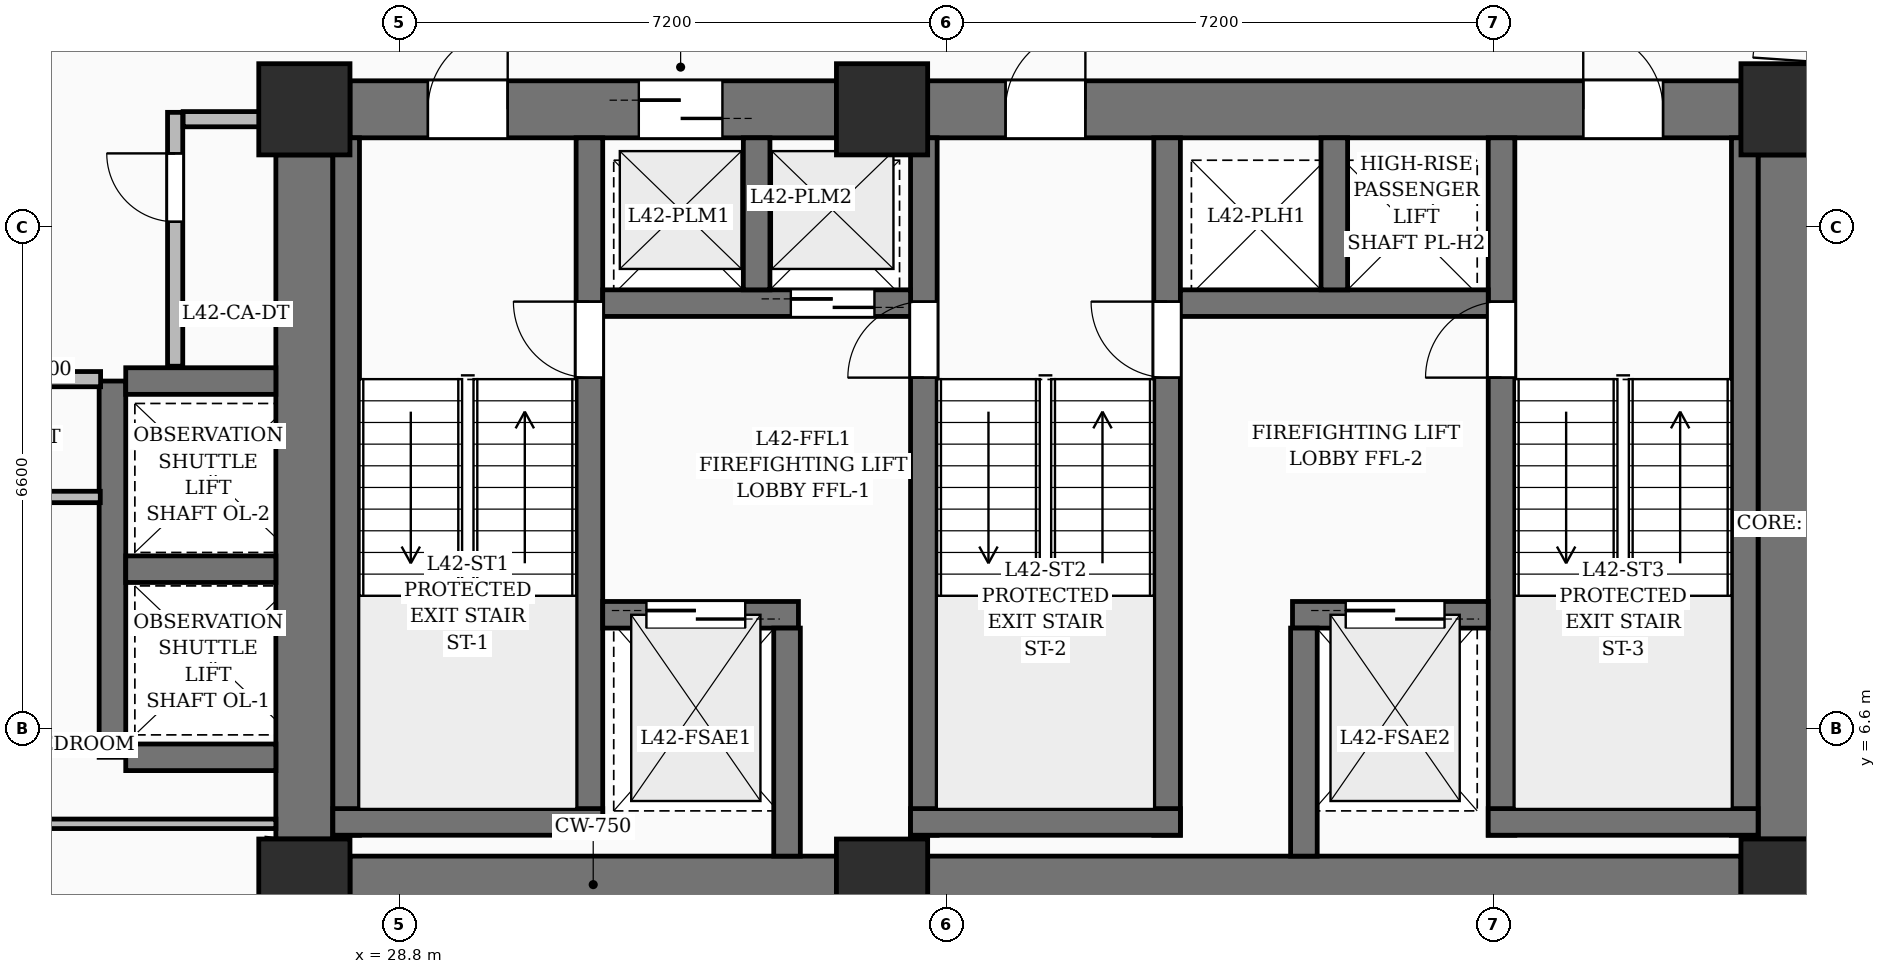
"""IFC4 building model, lengths in metres.
Left out: names, types, materials, properties, quantities, classifications, styles, units other than length and angle.
Written with IfcOpenShell. Run it as: python <this file> out.ifc"""

import sys

from ifc_helpers import new_model, si_unit, direction, frame, frame_2d, origin, origin_2d, place, context, subcontext, project, spatial, rectangle, extrude, element, fill, save


model = new_model("IFC4")
c1 = context("Model", 3, precision=1e-05, world=origin(), true_north=direction((0.0, 1.0)))
c2 = subcontext(c1, "Body", "Model", "MODEL_VIEW")
j1 = project(units=[si_unit("LENGTHUNIT", "METRE"), si_unit("PLANEANGLEUNIT", "RADIAN")], contexts=[c1])
p1 = place(None, origin())
s1 = spatial("IfcSite", under=j1, at=p1, CompositionType="ELEMENT")
p2 = place(p1, origin())
s2 = spatial("IfcBuilding", under=s1, at=p2, CompositionType="ELEMENT")
p3 = place(p2, frame((0.0, 0.0, 164.4)))
s3 = spatial("IfcBuildingStorey", under=s2, at=p3, CompositionType="ELEMENT", Elevation=164.4)
for number, where, z_axis, x_axis in (
    (1, (27.55, 4.55, 0.0), (0.0, 0.0, 1.0), (1.0, 0.0, 0.0)),
    (2, (35.15, 4.55, 0.0), (0.0, 0.0, 1.0), (1.0, 0.0, 0.0)),
    (3, (47.05, 4.55, 0.0), (0.0, 0.0, 1.0), (1.0, 0.0, 0.0)),
    (4, (27.55, 14.75, 0.0), (0.0, 0.0, 1.0), (1.0, 0.0, 0.0)),
    (5, (35.15, 14.75, 0.0), (0.0, 0.0, 1.0), (1.0, 0.0, 0.0)),
    (6, (47.05, 14.75, 0.0), (0.0, 0.0, 1.0), (1.0, 0.0, 0.0)),
):
    element("IfcColumn", number, at=place(p3, frame(where, z_axis=z_axis, x_axis=x_axis)), inside=s3, PredefinedType="COLUMN", context=c2, shape_type="SweptSolid", body=[
        extrude(rectangle(XDim=1.2, YDim=1.2, at=origin_2d()), origin(), (0.0, 0.0, 1.0), 3.6),
    ])
p4 = place(p3, frame((28.15, 4.55, 0.0), z_axis=(0.0, 0.0, 1.0), x_axis=(1.0, 0.0, 0.0)))
e7 = element("IfcWall", 7, at=p4, inside=s3, PredefinedType="SHEAR", context=c2, shape_type="SweptSolid", body=[
    extrude(rectangle(XDim=6.4, YDim=0.75, at=frame_2d((3.2, 0.0))), origin(), (0.0, 0.0, 1.0), 3.6),
])
p5 = place(p3, frame((35.75, 4.55, 0.0), z_axis=(0.0, 0.0, 1.0), x_axis=(1.0, 0.0, 0.0)))
e8 = element("IfcWall", 8, at=p5, inside=s3, PredefinedType="SHEAR", context=c2, shape_type="SweptSolid", body=[
    extrude(rectangle(XDim=10.7, YDim=0.75, at=frame_2d((5.35, 0.0))), origin(), (0.0, 0.0, 1.0), 3.6),
])
p6 = place(p3, frame((28.15, 14.75, 0.0), z_axis=(0.0, 0.0, 1.0), x_axis=(1.0, 0.0, 0.0)))
e9 = element("IfcWall", 9, at=p6, inside=s3, PredefinedType="SHEAR", context=c2, shape_type="SweptSolid", body=[
    extrude(rectangle(XDim=6.4, YDim=0.75, at=frame_2d((3.2, 0.0))), origin(), (0.0, 0.0, 1.0), 3.6),
])
p7 = place(p6, frame((1.025, 0.0, 0.0)))
e10 = element("IfcOpeningElement", 10, at=p7, cuts=e9, PredefinedType="OPENING", context=c2, shape_type="SweptSolid", body=[
    extrude(rectangle(XDim=1.05, YDim=2.15, at=frame_2d((0.525, 1.075))), frame((0.0, 0.385, 0.0), z_axis=(0.0, -1.0, 0.0), x_axis=(1.0, 0.0, 0.0)), (0.0, 0.0, 1.0), 0.77),
])
p8 = place(p6, frame((3.8, 0.0, 0.0)))
e11 = element("IfcOpeningElement", 11, at=p8, cuts=e9, PredefinedType="OPENING", context=c2, shape_type="SweptSolid", body=[
    extrude(rectangle(XDim=1.1, YDim=2.2, at=frame_2d((0.55, 1.1))), frame((0.0, 0.385, 0.0), z_axis=(0.0, -1.0, 0.0), x_axis=(1.0, 0.0, 0.0)), (0.0, 0.0, 1.0), 0.77),
])
p9 = place(p3, frame((35.75, 14.75, 0.0), z_axis=(0.0, 0.0, 1.0), x_axis=(1.0, 0.0, 0.0)))
e12 = element("IfcWall", 12, at=p9, inside=s3, PredefinedType="SHEAR", context=c2, shape_type="SweptSolid", body=[
    extrude(rectangle(XDim=10.7, YDim=0.75, at=frame_2d((5.35, 0.0))), origin(), (0.0, 0.0, 1.0), 3.6),
])
p10 = place(p9, frame((1.025, 0.0, 0.0)))
e13 = element("IfcOpeningElement", 13, at=p10, cuts=e12, PredefinedType="OPENING", context=c2, shape_type="SweptSolid", body=[
    extrude(rectangle(XDim=1.05, YDim=2.15, at=frame_2d((0.525, 1.075))), frame((0.0, 0.385, 0.0), z_axis=(0.0, -1.0, 0.0), x_axis=(1.0, 0.0, 0.0)), (0.0, 0.0, 1.0), 0.77),
])
p11 = place(p9, frame((8.625, 0.0, 0.0)))
e14 = element("IfcOpeningElement", 14, at=p11, cuts=e12, PredefinedType="OPENING", context=c2, shape_type="SweptSolid", body=[
    extrude(rectangle(XDim=1.05, YDim=2.15, at=frame_2d((0.525, 1.075))), frame((0.0, 0.385, 0.0), z_axis=(0.0, -1.0, 0.0), x_axis=(1.0, 0.0, 0.0)), (0.0, 0.0, 1.0), 0.77),
])
for number, where, z_axis, x_axis in (
    (15, (27.55, 5.15, 0.0), (0.0, 0.0, 1.0), (0.0, 1.0, 0.0)),
    (16, (47.05, 5.15, 0.0), (0.0, 0.0, 1.0), (0.0, 1.0, 0.0)),
):
    element("IfcWall", number, at=place(p3, frame(where, z_axis=z_axis, x_axis=x_axis)), inside=s3, PredefinedType="SHEAR", context=c2, shape_type="SweptSolid", body=[
        extrude(rectangle(XDim=9.0, YDim=0.75, at=frame_2d((4.5, 0.0))), origin(), (0.0, 0.0, 1.0), 3.6),
    ])
p12 = place(p3, frame((28.1, 5.2, 0.0), z_axis=(0.0, 0.0, 1.0), x_axis=(0.0, 1.0, 0.0)))
e17 = element("IfcWall", 17, at=p12, inside=s3, PredefinedType="SOLIDWALL", context=c2, shape_type="SweptSolid", body=[
    extrude(rectangle(XDim=9.175, YDim=0.35, at=frame_2d((4.587, 0.0))), origin(), (0.0, 0.0, 1.0), 3.6),
])
p13 = place(p3, frame((31.3, 5.2, 0.0), z_axis=(0.0, 0.0, 1.0), x_axis=(0.0, 1.0, 0.0)))
e18 = element("IfcWall", 18, at=p13, inside=s3, PredefinedType="SOLIDWALL", context=c2, shape_type="SweptSolid", body=[
    extrude(rectangle(XDim=9.175, YDim=0.35, at=frame_2d((4.587, 0.0))), origin(), (0.0, 0.0, 1.0), 3.6),
])
p14 = place(p13, frame((6.02, 0.0, 0.0)))
e19 = element("IfcOpeningElement", 19, at=p14, cuts=e18, PredefinedType="OPENING", context=c2, shape_type="SweptSolid", body=[
    extrude(rectangle(XDim=1.0, YDim=2.15, at=frame_2d((0.5, 1.075))), frame((0.0, 0.185, 0.0), z_axis=(0.0, -1.0, 0.0), x_axis=(1.0, 0.0, 0.0)), (0.0, 0.0, 1.0), 0.37),
])
p15 = place(p3, frame((27.925, 5.375, 0.0), z_axis=(0.0, 0.0, 1.0), x_axis=(1.0, 0.0, 0.0)))
e20 = element("IfcWall", 20, at=p15, inside=s3, PredefinedType="SOLIDWALL", context=c2, shape_type="SweptSolid", body=[
    extrude(rectangle(XDim=3.55, YDim=0.35, at=frame_2d((1.775, 0.0))), origin(), (0.0, 0.0, 1.0), 3.6),
])
p16 = place(p3, frame((35.7, 5.2, 0.0), z_axis=(0.0, 0.0, 1.0), x_axis=(0.0, 1.0, 0.0)))
e21 = element("IfcWall", 21, at=p16, inside=s3, PredefinedType="SOLIDWALL", context=c2, shape_type="SweptSolid", body=[
    extrude(rectangle(XDim=9.175, YDim=0.35, at=frame_2d((4.587, 0.0))), origin(), (0.0, 0.0, 1.0), 3.6),
])
p17 = place(p16, frame((6.02, 0.0, 0.0)))
e22 = element("IfcOpeningElement", 22, at=p17, cuts=e21, PredefinedType="OPENING", context=c2, shape_type="SweptSolid", body=[
    extrude(rectangle(XDim=1.0, YDim=2.15, at=frame_2d((0.5, 1.075))), frame((0.0, 0.185, 0.0), z_axis=(0.0, -1.0, 0.0), x_axis=(1.0, 0.0, 0.0)), (0.0, 0.0, 1.0), 0.37),
])
p18 = place(p3, frame((38.9, 5.2, 0.0), z_axis=(0.0, 0.0, 1.0), x_axis=(0.0, 1.0, 0.0)))
e23 = element("IfcWall", 23, at=p18, inside=s3, PredefinedType="SOLIDWALL", context=c2, shape_type="SweptSolid", body=[
    extrude(rectangle(XDim=9.175, YDim=0.35, at=frame_2d((4.587, 0.0))), origin(), (0.0, 0.0, 1.0), 3.6),
])
p19 = place(p18, frame((6.02, 0.0, 0.0)))
e24 = element("IfcOpeningElement", 24, at=p19, cuts=e23, PredefinedType="OPENING", context=c2, shape_type="SweptSolid", body=[
    extrude(rectangle(XDim=1.0, YDim=2.15, at=frame_2d((0.5, 1.075))), frame((0.0, 0.185, 0.0), z_axis=(0.0, -1.0, 0.0), x_axis=(1.0, 0.0, 0.0)), (0.0, 0.0, 1.0), 0.37),
])
p20 = place(p3, frame((35.525, 5.375, 0.0), z_axis=(0.0, 0.0, 1.0), x_axis=(1.0, 0.0, 0.0)))
e25 = element("IfcWall", 25, at=p20, inside=s3, PredefinedType="SOLIDWALL", context=c2, shape_type="SweptSolid", body=[
    extrude(rectangle(XDim=3.55, YDim=0.35, at=frame_2d((1.775, 0.0))), origin(), (0.0, 0.0, 1.0), 3.6),
])
p21 = place(p3, frame((43.3, 5.2, 0.0), z_axis=(0.0, 0.0, 1.0), x_axis=(0.0, 1.0, 0.0)))
e26 = element("IfcWall", 26, at=p21, inside=s3, PredefinedType="SOLIDWALL", context=c2, shape_type="SweptSolid", body=[
    extrude(rectangle(XDim=9.175, YDim=0.35, at=frame_2d((4.587, 0.0))), origin(), (0.0, 0.0, 1.0), 3.6),
])
p22 = place(p21, frame((6.02, 0.0, 0.0)))
e27 = element("IfcOpeningElement", 27, at=p22, cuts=e26, PredefinedType="OPENING", context=c2, shape_type="SweptSolid", body=[
    extrude(rectangle(XDim=1.0, YDim=2.15, at=frame_2d((0.5, 1.075))), frame((0.0, 0.185, 0.0), z_axis=(0.0, -1.0, 0.0), x_axis=(1.0, 0.0, 0.0)), (0.0, 0.0, 1.0), 0.37),
])
p23 = place(p3, frame((46.5, 5.2, 0.0), z_axis=(0.0, 0.0, 1.0), x_axis=(0.0, 1.0, 0.0)))
e28 = element("IfcWall", 28, at=p23, inside=s3, PredefinedType="SOLIDWALL", context=c2, shape_type="SweptSolid", body=[
    extrude(rectangle(XDim=9.175, YDim=0.35, at=frame_2d((4.587, 0.0))), origin(), (0.0, 0.0, 1.0), 3.6),
])
p24 = place(p3, frame((43.125, 5.375, 0.0), z_axis=(0.0, 0.0, 1.0), x_axis=(1.0, 0.0, 0.0)))
e29 = element("IfcWall", 29, at=p24, inside=s3, PredefinedType="SOLIDWALL", context=c2, shape_type="SweptSolid", body=[
    extrude(rectangle(XDim=3.55, YDim=0.35, at=frame_2d((1.775, 0.0))), origin(), (0.0, 0.0, 1.0), 3.6),
])
p25 = place(p3, frame((31.475, 8.1, 0.0), z_axis=(0.0, 0.0, 1.0), x_axis=(1.0, 0.0, 0.0)))
e30 = element("IfcWall", 30, at=p25, inside=s3, PredefinedType="SOLIDWALL", context=c2, shape_type="SweptSolid", body=[
    extrude(rectangle(XDim=2.575, YDim=0.35, at=frame_2d((1.288, 0.0))), origin(), (0.0, 0.0, 1.0), 3.6),
])
p26 = place(p25, frame((0.575, 0.0, 0.0)))
e31 = element("IfcOpeningElement", 31, at=p26, cuts=e30, PredefinedType="OPENING", context=c2, shape_type="SweptSolid", body=[
    extrude(rectangle(XDim=1.3, YDim=2.25, at=frame_2d((0.65, 1.125))), frame((0.0, 0.185, 0.0), z_axis=(0.0, -1.0, 0.0), x_axis=(1.0, 0.0, 0.0)), (0.0, 0.0, 1.0), 0.37),
])
p27 = place(p3, frame((40.55, 8.1, 0.0), z_axis=(0.0, 0.0, 1.0), x_axis=(1.0, 0.0, 0.0)))
e32 = element("IfcWall", 32, at=p27, inside=s3, PredefinedType="SOLIDWALL", context=c2, shape_type="SweptSolid", body=[
    extrude(rectangle(XDim=2.575, YDim=0.35, at=frame_2d((1.288, 0.0))), origin(), (0.0, 0.0, 1.0), 3.6),
])
p28 = place(p27, frame((0.7, 0.0, 0.0)))
e33 = element("IfcOpeningElement", 33, at=p28, cuts=e32, PredefinedType="OPENING", context=c2, shape_type="SweptSolid", body=[
    extrude(rectangle(XDim=1.3, YDim=2.25, at=frame_2d((0.65, 1.125))), frame((0.0, 0.185, 0.0), z_axis=(0.0, -1.0, 0.0), x_axis=(1.0, 0.0, 0.0)), (0.0, 0.0, 1.0), 0.37),
])
for number, where, z_axis, x_axis in (
    (34, (33.9, 4.925, 0.0), (0.0, 0.0, 1.0), (0.0, 1.0, 0.0)),
    (35, (40.7, 4.925, 0.0), (0.0, 0.0, 1.0), (0.0, 1.0, 0.0)),
):
    element("IfcWall", number, at=place(p3, frame(where, z_axis=z_axis, x_axis=x_axis)), inside=s3, PredefinedType="SOLIDWALL", context=c2, shape_type="SweptSolid", body=[
        extrude(rectangle(XDim=3.0, YDim=0.35, at=frame_2d((1.5, 0.0))), origin(), (0.0, 0.0, 1.0), 3.6),
    ])
p29 = place(p3, frame((31.475, 12.2, 0.0), z_axis=(0.0, 0.0, 1.0), x_axis=(1.0, 0.0, 0.0)))
e36 = element("IfcWall", 36, at=p29, inside=s3, PredefinedType="SOLIDWALL", context=c2, shape_type="SweptSolid", body=[
    extrude(rectangle(XDim=4.05, YDim=0.35, at=frame_2d((2.025, 0.0))), origin(), (0.0, 0.0, 1.0), 3.6),
])
p30 = place(p29, frame((2.475, 0.0, 0.0)))
e37 = element("IfcOpeningElement", 37, at=p30, cuts=e36, PredefinedType="OPENING", context=c2, shape_type="SweptSolid", body=[
    extrude(rectangle(XDim=1.1, YDim=2.2, at=frame_2d((0.55, 1.1))), frame((0.0, 0.185, 0.0), z_axis=(0.0, -1.0, 0.0), x_axis=(1.0, 0.0, 0.0)), (0.0, 0.0, 1.0), 0.37),
])
p31 = place(p3, frame((33.5, 12.375, 0.0), z_axis=(0.0, 0.0, 1.0), x_axis=(0.0, 1.0, 0.0)))
e38 = element("IfcWall", 38, at=p31, inside=s3, PredefinedType="SOLIDWALL", context=c2, shape_type="SweptSolid", body=[
    extrude(rectangle(XDim=2.0, YDim=0.35, at=frame_2d((1.0, 0.0))), origin(), (0.0, 0.0, 1.0), 3.6),
])
p32 = place(p3, frame((39.075, 12.2, 0.0), z_axis=(0.0, 0.0, 1.0), x_axis=(1.0, 0.0, 0.0)))
e39 = element("IfcWall", 39, at=p32, inside=s3, PredefinedType="SOLIDWALL", context=c2, shape_type="SweptSolid", body=[
    extrude(rectangle(XDim=4.05, YDim=0.35, at=frame_2d((2.025, 0.0))), origin(), (0.0, 0.0, 1.0), 3.6),
])
p33 = place(p3, frame((41.1, 12.375, 0.0), z_axis=(0.0, 0.0, 1.0), x_axis=(0.0, 1.0, 0.0)))
e40 = element("IfcWall", 40, at=p33, inside=s3, PredefinedType="SOLIDWALL", context=c2, shape_type="SweptSolid", body=[
    extrude(rectangle(XDim=2.0, YDim=0.35, at=frame_2d((1.0, 0.0))), origin(), (0.0, 0.0, 1.0), 3.6),
])
p34 = place(p3, frame((25.025, 6.225, 0.0), z_axis=(0.0, 0.0, 1.0), x_axis=(0.0, 1.0, 0.0)))
e41 = element("IfcWall", 41, at=p34, inside=s3, PredefinedType="SOLIDWALL", context=c2, shape_type="SweptSolid", body=[
    extrude(rectangle(XDim=4.95, YDim=0.35, at=frame_2d((2.475, 0.0))), origin(), (0.0, 0.0, 1.0), 3.6),
])
for number, where, z_axis, x_axis in (
    (42, (25.2, 6.225, 0.0), (0.0, 0.0, 1.0), (1.0, 0.0, 0.0)),
    (43, (25.2, 8.7, 0.0), (0.0, 0.0, 1.0), (1.0, 0.0, 0.0)),
    (44, (25.2, 11.175, 0.0), (0.0, 0.0, 1.0), (1.0, 0.0, 0.0)),
):
    element("IfcWall", number, at=place(p3, frame(where, z_axis=z_axis, x_axis=x_axis)), inside=s3, PredefinedType="SOLIDWALL", context=c2, shape_type="SweptSolid", body=[
        extrude(rectangle(XDim=1.975, YDim=0.35, at=frame_2d((0.988, 0.0))), origin(), (0.0, 0.0, 1.0), 3.6),
    ])
p35 = place(p3, frame((25.85, 11.37, 0.0), z_axis=(0.0, 0.0, 1.0), x_axis=(0.0, 1.0, 0.0)))
e45 = element("IfcWall", 45, at=p35, inside=s3, PredefinedType="PARTITIONING", context=c2, shape_type="SweptSolid", body=[
    extrude(rectangle(XDim=3.34, YDim=0.2, at=frame_2d((1.67, 0.0))), origin(), (0.0, 0.0, 1.0), 3.35),
])
p36 = place(p35, frame((1.9, 0.0, 0.0)))
e46 = element("IfcOpeningElement", 46, at=p36, cuts=e45, PredefinedType="OPENING", context=c2, shape_type="SweptSolid", body=[
    extrude(rectangle(XDim=0.9, YDim=2.1, at=frame_2d((0.45, 1.05))), frame((0.0, 0.11, 0.0), z_axis=(0.0, -1.0, 0.0), x_axis=(1.0, 0.0, 0.0)), (0.0, 0.0, 1.0), 0.22),
])
p37 = place(p3, frame((25.955, 14.62, 0.0), z_axis=(0.0, 0.0, 1.0), x_axis=(1.0, 0.0, 0.0)))
e47 = element("IfcWall", 47, at=p37, inside=s3, PredefinedType="PARTITIONING", context=c2, shape_type="SweptSolid", body=[
    extrude(rectangle(XDim=1.205, YDim=0.2, at=frame_2d((0.603, 0.0))), origin(), (0.0, 0.0, 1.0), 3.35),
])
p38 = place(p3, frame((21.485, 11.2, 0.0), z_axis=(0.0, 0.0, 1.0), x_axis=(1.0, 0.0, 0.0)))
e48 = element("IfcWall", 48, at=p38, inside=s3, PredefinedType="PARTITIONING", context=c2, shape_type="SweptSolid", body=[
    extrude(rectangle(XDim=3.384, YDim=0.2, at=frame_2d((1.692, 0.0))), origin(), (0.0, 0.0, 1.0), 3.35),
])
p39 = place(p3, frame((23.82, 9.65, 0.0), z_axis=(0.0, 0.0, 1.0), x_axis=(1.0, 0.0, 0.0)))
e49 = element("IfcWall", 49, at=p39, inside=s3, PredefinedType="PARTITIONING", context=c2, shape_type="SweptSolid", body=[
    extrude(rectangle(XDim=1.045, YDim=0.15, at=frame_2d((0.522, 0.0))), origin(), (0.0, 0.0, 1.0), 3.35),
])
p40 = place(p3, frame((27.175, 5.35, 0.0), z_axis=(0.0, 0.0, 1.0), x_axis=(-1.0, 0.0, 0.0)))
e50 = element("IfcWall", 50, at=p40, inside=s3, PredefinedType="PARTITIONING", context=c2, shape_type="SweptSolid", body=[
    extrude(rectangle(XDim=4.155, YDim=0.125, at=frame_2d((2.078, 0.0))), origin(), (0.0, 0.0, 1.0), 3.35),
])
p41 = place(p3, frame((26.814, 1.899, 0.0), z_axis=(0.0, 0.0, 1.0), x_axis=(0.104043246785, 0.994572774008, 0.0)))
e51 = element("IfcWall", 51, at=p41, inside=s3, PredefinedType="PARTITIONING", context=c2, shape_type="SweptSolid", body=[
    extrude(rectangle(XDim=3.269, YDim=0.2, at=frame_2d((1.634, 0.0))), origin(), (0.0, 0.0, 1.0), 2.57),
])
p42 = place(p7, origin())
e52 = element("IfcDoor", 52, at=p42, inside=s3, OperationType="SINGLE_SWING_RIGHT", PredefinedType="DOOR", context=c2, shape_type="SweptSolid", body=[
    extrude(rectangle(XDim=1.05, YDim=2.15, at=frame_2d((0.525, 1.075))), frame((0.0, 0.025, 0.0), z_axis=(0.0, -1.0, 0.0), x_axis=(1.0, 0.0, 0.0)), (0.0, 0.0, 1.0), 0.05),
])
fill(e10, e52)
p43 = place(p10, origin())
e53 = element("IfcDoor", 53, at=p43, inside=s3, OperationType="SINGLE_SWING_RIGHT", PredefinedType="DOOR", context=c2, shape_type="SweptSolid", body=[
    extrude(rectangle(XDim=1.05, YDim=2.15, at=frame_2d((0.525, 1.075))), frame((0.0, 0.025, 0.0), z_axis=(0.0, -1.0, 0.0), x_axis=(1.0, 0.0, 0.0)), (0.0, 0.0, 1.0), 0.05),
])
fill(e13, e53)
p44 = place(p11, origin())
e54 = element("IfcDoor", 54, at=p44, inside=s3, OperationType="SINGLE_SWING_LEFT", PredefinedType="DOOR", context=c2, shape_type="SweptSolid", body=[
    extrude(rectangle(XDim=1.05, YDim=2.15, at=frame_2d((0.525, 1.075))), frame((0.0, 0.025, 0.0), z_axis=(0.0, -1.0, 0.0), x_axis=(1.0, 0.0, 0.0)), (0.0, 0.0, 1.0), 0.05),
])
fill(e14, e54)
p45 = place(p14, origin())
e55 = element("IfcDoor", 55, at=p45, inside=s3, OperationType="SINGLE_SWING_RIGHT", PredefinedType="DOOR", context=c2, shape_type="SweptSolid", body=[
    extrude(rectangle(XDim=1.0, YDim=2.15, at=frame_2d((0.5, 1.075))), frame((0.0, 0.025, 0.0), z_axis=(0.0, -1.0, 0.0), x_axis=(1.0, 0.0, 0.0)), (0.0, 0.0, 1.0), 0.05),
])
fill(e19, e55)
p46 = place(p17, origin())
e56 = element("IfcDoor", 56, at=p46, inside=s3, OperationType="SINGLE_SWING_LEFT", PredefinedType="DOOR", context=c2, shape_type="SweptSolid", body=[
    extrude(rectangle(XDim=1.0, YDim=2.15, at=frame_2d((0.5, 1.075))), frame((0.0, 0.025, 0.0), z_axis=(0.0, -1.0, 0.0), x_axis=(1.0, 0.0, 0.0)), (0.0, 0.0, 1.0), 0.05),
])
fill(e22, e56)
p47 = place(p19, origin())
e57 = element("IfcDoor", 57, at=p47, inside=s3, OperationType="SINGLE_SWING_RIGHT", PredefinedType="DOOR", context=c2, shape_type="SweptSolid", body=[
    extrude(rectangle(XDim=1.0, YDim=2.15, at=frame_2d((0.5, 1.075))), frame((0.0, 0.025, 0.0), z_axis=(0.0, -1.0, 0.0), x_axis=(1.0, 0.0, 0.0)), (0.0, 0.0, 1.0), 0.05),
])
fill(e24, e57)
p48 = place(p22, origin())
e58 = element("IfcDoor", 58, at=p48, inside=s3, OperationType="SINGLE_SWING_LEFT", PredefinedType="DOOR", context=c2, shape_type="SweptSolid", body=[
    extrude(rectangle(XDim=1.0, YDim=2.15, at=frame_2d((0.5, 1.075))), frame((0.0, 0.025, 0.0), z_axis=(0.0, -1.0, 0.0), x_axis=(1.0, 0.0, 0.0)), (0.0, 0.0, 1.0), 0.05),
])
fill(e27, e58)
p49 = place(p26, origin())
e59 = element("IfcDoor", 59, at=p49, inside=s3, OperationType="DOUBLE_DOOR_SLIDING", PredefinedType="DOOR", context=c2, shape_type="SweptSolid", body=[
    extrude(rectangle(XDim=1.3, YDim=2.25, at=frame_2d((0.65, 1.125))), frame((0.0, 0.025, 0.0), z_axis=(0.0, -1.0, 0.0), x_axis=(1.0, 0.0, 0.0)), (0.0, 0.0, 1.0), 0.05),
])
fill(e31, e59)
p50 = place(p28, origin())
e60 = element("IfcDoor", 60, at=p50, inside=s3, OperationType="DOUBLE_DOOR_SLIDING", PredefinedType="DOOR", context=c2, shape_type="SweptSolid", body=[
    extrude(rectangle(XDim=1.3, YDim=2.25, at=frame_2d((0.65, 1.125))), frame((0.0, 0.025, 0.0), z_axis=(0.0, -1.0, 0.0), x_axis=(1.0, 0.0, 0.0)), (0.0, 0.0, 1.0), 0.05),
])
fill(e33, e60)
p51 = place(p8, origin())
e61 = element("IfcDoor", 61, at=p51, inside=s3, OperationType="DOUBLE_DOOR_SLIDING", PredefinedType="DOOR", context=c2, shape_type="SweptSolid", body=[
    extrude(rectangle(XDim=1.1, YDim=2.2, at=frame_2d((0.55, 1.1))), frame((0.0, 0.025, 0.0), z_axis=(0.0, -1.0, 0.0), x_axis=(1.0, 0.0, 0.0)), (0.0, 0.0, 1.0), 0.05),
])
fill(e11, e61)
p52 = place(p30, origin())
e62 = element("IfcDoor", 62, at=p52, inside=s3, OperationType="DOUBLE_DOOR_SLIDING", PredefinedType="DOOR", context=c2, shape_type="SweptSolid", body=[
    extrude(rectangle(XDim=1.1, YDim=2.2, at=frame_2d((0.55, 1.1))), frame((0.0, 0.025, 0.0), z_axis=(0.0, -1.0, 0.0), x_axis=(1.0, 0.0, 0.0)), (0.0, 0.0, 1.0), 0.05),
])
fill(e37, e62)
p53 = place(p36, origin())
e63 = element("IfcDoor", 63, at=p53, inside=s3, OperationType="SINGLE_SWING_RIGHT", PredefinedType="DOOR", context=c2, shape_type="SweptSolid", body=[
    extrude(rectangle(XDim=0.9, YDim=2.1, at=frame_2d((0.45, 1.05))), frame((0.0, 0.025, 0.0), z_axis=(0.0, -1.0, 0.0), x_axis=(1.0, 0.0, 0.0)), (0.0, 0.0, 1.0), 0.05),
])
fill(e46, e63)
save(model, sys.argv[1])
